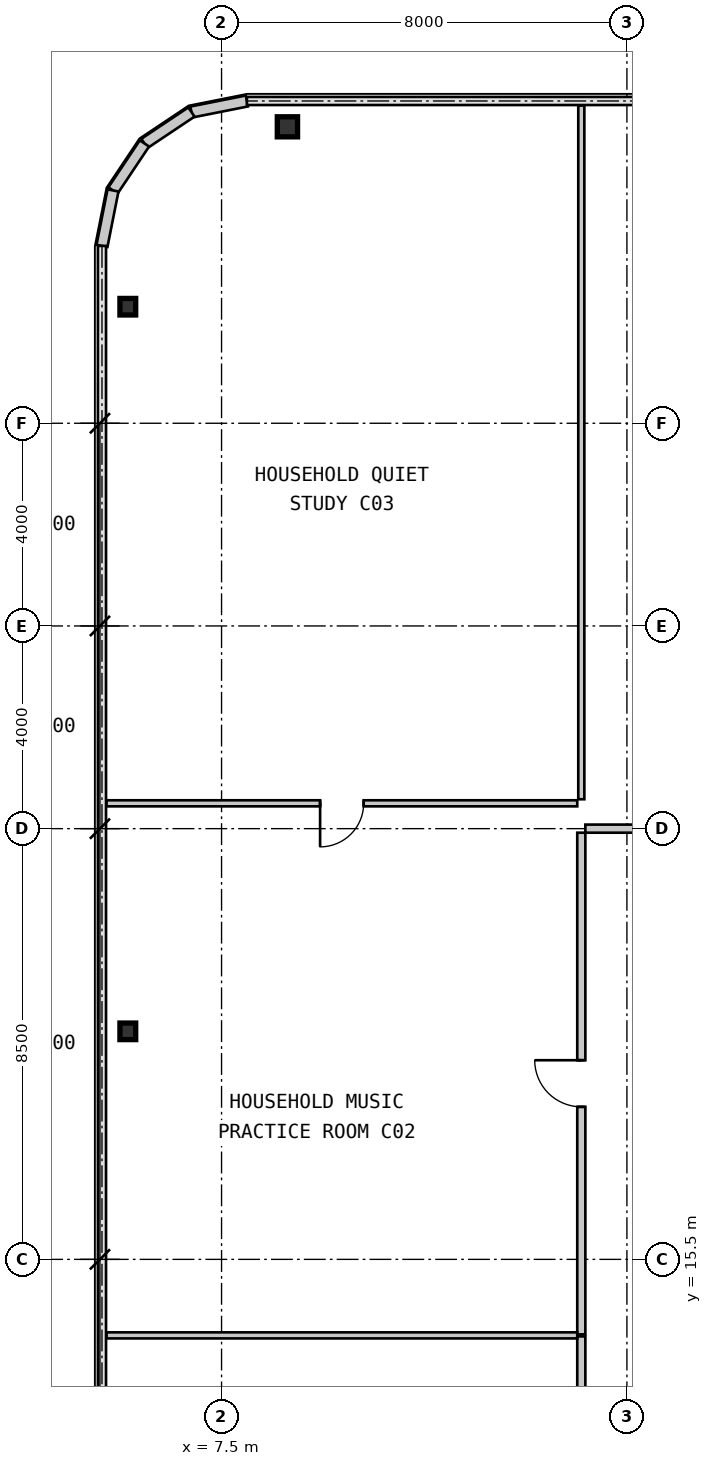
"""IFC4 building model, lengths in metres.
Left out: names, types, materials, properties, quantities, classifications, styles, units other than length and angle.
Written with IfcOpenShell. Run it as: python <this file> out.ifc"""

import sys

from ifc_helpers import new_model, si_unit, direction, frame, frame_2d, origin, origin_2d, place, context, subcontext, project, spatial, rectangle, i_section, extrude, source, transform, mapped, element, fill, save


model = new_model("IFC4")
c1 = context("Model", 3, precision=1e-05, world=origin(), true_north=direction((0.0, 1.0)))
c2 = subcontext(c1, "Body", "Model", "MODEL_VIEW")
j1 = project(units=[si_unit("LENGTHUNIT", "METRE"), si_unit("PLANEANGLEUNIT", "RADIAN")], contexts=[c1])
p1 = place(None, origin())
s1 = spatial("IfcSite", under=j1, at=p1, CompositionType="ELEMENT")
p2 = place(p1, origin())
s2 = spatial("IfcBuilding", under=s1, at=p2, CompositionType="ELEMENT")
p3 = place(p2, frame((0.0, 0.0, 38.85)))
s3 = spatial("IfcBuildingStorey", under=s2, at=p3, CompositionType="ELEMENT", Elevation=38.85)
m1 = source(origin(), c2, "Body", "SweptSolid", [
    extrude(i_section(OverallWidth=0.4, OverallDepth=0.396, WebThickness=0.022, FlangeThickness=0.034, at=origin_2d()), origin(), (0.0, 0.0, 1.0), 3.15),
])
p4 = place(p3, frame((8.8, 37.85, 0.0), z_axis=(0.0, 0.0, 1.0), x_axis=(1.0, 0.0, 0.0)))
e1 = element("IfcColumn", 1, at=p4, inside=s3, PredefinedType="COLUMN", context=c2, shape_type="MappedRepresentation", body=[
    mapped(m1, transform((0.0, 0.0, 0.0), scale=1.0)),
])
m2 = source(origin(), c2, "Body", "SweptSolid", [
    extrude(i_section(OverallWidth=0.311, OverallDepth=0.327, WebThickness=0.016, FlangeThickness=0.025, at=origin_2d()), origin(), (0.0, 0.0, 1.0), 3.15),
])
for number, where, z_axis, x_axis in (
    (2, (5.65, 20.0, 0.0), (0.0, 0.0, 1.0), (1.0, 0.0, 0.0)),
    (3, (5.65, 34.3, 0.0), (0.0, 0.0, 1.0), (1.0, 0.0, 0.0)),
):
    element("IfcColumn", number, at=place(p3, frame(where, z_axis=z_axis, x_axis=x_axis)), inside=s3, PredefinedType="COLUMN", context=c2, shape_type="MappedRepresentation", body=[
        mapped(m2, transform((0.0, 0.0, 0.0), scale=1.0)),
    ])
m3 = source(origin(), c2, "Body", "SweptSolid", [
    extrude(rectangle(XDim=1.116, YDim=0.22, at=frame_2d((0.558, 0.0))), origin(), (0.0, 0.0, 1.0), 2.93),
])
for number, where, z_axis, x_axis in (
    (4, (8.0, 38.36, 0.0), (0.0, 0.0, 1.0), (-0.981, -0.195, 0.0)),
    (5, (6.906, 38.142, 0.0), (0.0, 0.0, 1.0), (-0.831, -0.556, 0.0)),
    (6, (5.978, 37.522, 0.0), (0.0, 0.0, 1.0), (-0.556, -0.831, 0.0)),
    (7, (5.358, 36.594, 0.0), (0.0, 0.0, 1.0), (-0.195, -0.981, 0.0)),
):
    element("IfcWall", number, at=place(p3, frame(where, z_axis=z_axis, x_axis=x_axis)), inside=s3, PredefinedType="SOLIDWALL", context=c2, shape_type="MappedRepresentation", body=[
        mapped(m3, transform((0.0, 0.0, 0.0), scale=1.0)),
    ])
m4 = source(origin(), c2, "Body", "SweptSolid", [
    extrude(rectangle(XDim=4.7, YDim=0.16, at=frame_2d((2.35, 0.0))), origin(), (0.0, 0.0, 1.0), 2.93),
])
p5 = place(p3, frame((14.6, 9.28, 0.0), z_axis=(0.0, 0.0, 1.0), x_axis=(0.0, 1.0, 0.0)))
e8 = element("IfcWall", 8, at=p5, inside=s3, PredefinedType="PARTITIONING", context=c2, shape_type="MappedRepresentation", body=[
    mapped(m4, transform((0.0, 0.0, 0.0), scale=1.0)),
])
m5 = source(origin(), c2, "Body", "SweptSolid", [
    extrude(rectangle(XDim=0.92, YDim=2.1, at=frame_2d((0.46, 1.05))), frame((0.0, 0.09, 0.0), z_axis=(0.0, -1.0, 0.0), x_axis=(1.0, 0.0, 0.0)), (0.0, 0.0, 1.0), 0.18),
])
p6 = place(p5, frame((1.89, 0.0, 0.0)))
e9 = element("IfcOpeningElement", 9, at=p6, cuts=e8, PredefinedType="OPENING", context=c2, shape_type="MappedRepresentation", body=[
    mapped(m5, transform((0.0, 0.0, 0.0), scale=1.0)),
])
m6 = source(origin(), c2, "Body", "SweptSolid", [
    extrude(rectangle(XDim=9.9, YDim=0.16, at=frame_2d((4.95, 0.0))), origin(), (0.0, 0.0, 1.0), 2.93),
])
p7 = place(p3, frame((14.6, 14.02, 0.0), z_axis=(0.0, 0.0, 1.0), x_axis=(0.0, 1.0, 0.0)))
e10 = element("IfcWall", 10, at=p7, inside=s3, PredefinedType="PARTITIONING", context=c2, shape_type="MappedRepresentation", body=[
    mapped(m6, transform((0.0, 0.0, 0.0), scale=1.0)),
])
p8 = place(p7, frame((4.49, 0.0, 0.0)))
e11 = element("IfcOpeningElement", 11, at=p8, cuts=e10, PredefinedType="OPENING", context=c2, shape_type="MappedRepresentation", body=[
    mapped(m5, transform((0.0, 0.0, 0.0), scale=1.0)),
])
m7 = source(origin(), c2, "Body", "SweptSolid", [
    extrude(rectangle(XDim=4.13, YDim=0.16, at=frame_2d((2.065, 0.0))), origin(), (0.0, 0.0, 1.0), 2.93),
])
p9 = place(p3, frame((14.68, 24.0, 0.0), z_axis=(0.0, 0.0, 1.0), x_axis=(1.0, 0.0, 0.0)))
e12 = element("IfcWall", 12, at=p9, inside=s3, PredefinedType="PARTITIONING", context=c2, shape_type="MappedRepresentation", body=[
    mapped(m7, transform((0.0, 0.0, 0.0), scale=1.0)),
])
p10 = place(p9, frame((1.69, 0.0, 0.0)))
e13 = element("IfcOpeningElement", 13, at=p10, cuts=e12, PredefinedType="OPENING", context=c2, shape_type="MappedRepresentation", body=[
    mapped(m5, transform((0.0, 0.0, 0.0), scale=1.0)),
])
m8 = source(origin(), c2, "Body", "SweptSolid", [
    extrude(rectangle(XDim=9.29, YDim=0.12, at=frame_2d((4.645, 0.0))), origin(), (0.0, 0.0, 1.0), 2.93),
])
p11 = place(p3, frame((5.23, 14.0, 0.0), z_axis=(0.0, 0.0, 1.0), x_axis=(1.0, 0.0, 0.0)))
e14 = element("IfcWall", 14, at=p11, inside=s3, PredefinedType="PARTITIONING", context=c2, shape_type="MappedRepresentation", body=[
    mapped(m8, transform((0.0, 0.0, 0.0), scale=1.0)),
])
p12 = place(p3, frame((5.23, 24.5, 0.0), z_axis=(0.0, 0.0, 1.0), x_axis=(1.0, 0.0, 0.0)))
e15 = element("IfcWall", 15, at=p12, inside=s3, PredefinedType="PARTITIONING", context=c2, shape_type="MappedRepresentation", body=[
    mapped(m8, transform((0.0, 0.0, 0.0), scale=1.0)),
])
m9 = source(origin(), c2, "Body", "SweptSolid", [
    extrude(rectangle(XDim=0.86, YDim=2.1, at=frame_2d((0.43, 1.05))), frame((0.0, 0.07, 0.0), z_axis=(0.0, -1.0, 0.0), x_axis=(1.0, 0.0, 0.0)), (0.0, 0.0, 1.0), 0.14),
])
p13 = place(p12, frame((4.215, 0.0, 0.0)))
e16 = element("IfcOpeningElement", 16, at=p13, cuts=e15, PredefinedType="OPENING", context=c2, shape_type="MappedRepresentation", body=[
    mapped(m9, transform((0.0, 0.0, 0.0), scale=1.0)),
])
m10 = source(origin(), c2, "Body", "SweptSolid", [
    extrude(rectangle(XDim=13.69, YDim=0.12, at=frame_2d((6.845, 0.0))), origin(), (0.0, 0.0, 1.0), 2.93),
])
p14 = place(p3, frame((14.6, 38.27, 0.0), z_axis=(0.0, 0.0, 1.0), x_axis=(0.0, -1.0, 0.0)))
e17 = element("IfcWall", 17, at=p14, inside=s3, PredefinedType="PARTITIONING", context=c2, shape_type="MappedRepresentation", body=[
    mapped(m10, transform((0.0, 0.0, 0.0), scale=1.0)),
])
m11 = source(origin(), c2, "Body", "SweptSolid", [
    extrude(rectangle(XDim=0.92, YDim=2.1, at=frame_2d((0.46, 1.05))), frame((0.0, 0.025, 0.0), z_axis=(0.0, -1.0, 0.0), x_axis=(1.0, 0.0, 0.0)), (0.0, 0.0, 1.0), 0.05),
])
p15 = place(p8, origin())
e18 = element("IfcDoor", 18, at=p15, inside=s3, OperationType="SINGLE_SWING_RIGHT", PredefinedType="DOOR", context=c2, shape_type="MappedRepresentation", body=[
    mapped(m11, transform((0.0, 0.0, 0.0), scale=1.0)),
])
fill(e11, e18)
m12 = source(origin(), c2, "Body", "SweptSolid", [
    extrude(rectangle(XDim=0.86, YDim=2.1, at=frame_2d((0.43, 1.05))), frame((0.0, 0.025, 0.0), z_axis=(0.0, -1.0, 0.0), x_axis=(1.0, 0.0, 0.0)), (0.0, 0.0, 1.0), 0.05),
])
p16 = place(p13, frame((0.86, 0.0, 0.0), z_axis=(0.0, 0.0, 1.0), x_axis=(-1.0, 0.0, 0.0)))
e19 = element("IfcDoor", 19, at=p16, inside=s3, OperationType="SINGLE_SWING_RIGHT", PredefinedType="DOOR", context=c2, shape_type="MappedRepresentation", body=[
    mapped(m12, transform((0.0, 0.0, 0.0), scale=1.0)),
])
fill(e16, e19)
save(model, sys.argv[1])
